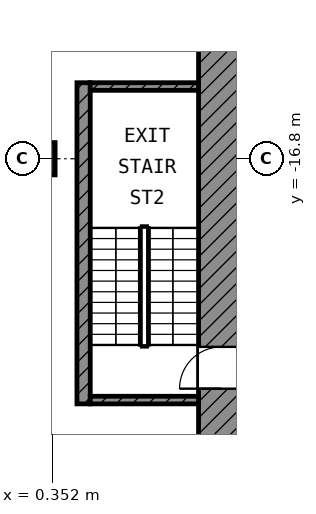
"""IFC4 building model, lengths in metres.
Left out: names, types, materials, properties, quantities, classifications, styles, units other than length and angle.
Written with IfcOpenShell. Run it as: python <this file> out.ifc"""

import sys

from ifc_helpers import new_model, si_unit, direction, frame, frame_2d, origin, origin_2d, place, context, subcontext, project, spatial, rectangle, extrude, element, fill, save


model = new_model("IFC4")
c1 = context("Model", 3, precision=1e-05, world=origin(), true_north=direction((0.0, 1.0)))
c2 = subcontext(c1, "Body", "Model", "MODEL_VIEW")
j1 = project(units=[si_unit("LENGTHUNIT", "METRE"), si_unit("PLANEANGLEUNIT", "RADIAN")], contexts=[c1])
p1 = place(None, origin())
s1 = spatial("IfcSite", under=j1, at=p1, CompositionType="ELEMENT")
p2 = place(p1, origin())
s2 = spatial("IfcBuilding", under=s1, at=p2, CompositionType="ELEMENT")
p3 = place(p2, frame((0.0, 0.0, 234.8)))
s3 = spatial("IfcBuildingStorey", under=s2, at=p3, CompositionType="ELEMENT", Elevation=234.8)
p4 = place(p3, frame((0.0, -16.8, 0.0), z_axis=(0.0, 0.0, 1.0), x_axis=(1.0, 0.0, 0.0)))
e1 = element("IfcColumn", 1, at=p4, inside=s3, PredefinedType="COLUMN", context=c2, shape_type="SweptSolid", body=[
    extrude(rectangle(XDim=0.85, YDim=0.85, at=origin_2d()), origin(), (0.0, 0.0, 1.0), 4.2),
])
p5 = place(p3, frame((4.8, -24.8, 0.0), z_axis=(0.0, 0.0, 1.0), x_axis=(0.0, 1.0, 0.0)))
e2 = element("IfcWall", 2, at=p5, inside=s3, PredefinedType="SHEAR", context=c2, shape_type="SweptSolid", body=[
    extrude(rectangle(XDim=19.4, YDim=1.2, at=frame_2d((9.7, 0.0))), origin(), (0.0, 0.0, 1.0), 3.6),
])
p6 = place(p5, frame((11.25, 0.0, 0.0)))
e3 = element("IfcOpeningElement", 3, at=p6, cuts=e2, PredefinedType="OPENING", context=c2, shape_type="SweptSolid", body=[
    extrude(rectangle(XDim=1.1, YDim=2.1, at=frame_2d((0.55, 1.05))), frame((0.0, 0.61, 0.0), z_axis=(0.0, -1.0, 0.0), x_axis=(1.0, 0.0, 0.0)), (0.0, 0.0, 1.0), 1.22),
])
p7 = place(p5, frame((1.95, 0.0, 0.0)))
e4 = element("IfcOpeningElement", 4, at=p7, cuts=e2, PredefinedType="OPENING", context=c2, shape_type="SweptSolid", body=[
    extrude(rectangle(XDim=1.1, YDim=2.1, at=frame_2d((0.55, 1.05))), frame((0.0, 0.61, 0.0), z_axis=(0.0, -1.0, 0.0), x_axis=(1.0, 0.0, 0.0)), (0.0, 0.0, 1.0), 1.22),
])
p8 = place(p3, frame((1.175, -23.25, 0.0), z_axis=(0.0, 0.0, 1.0), x_axis=(0.0, 1.0, 0.0)))
e5 = element("IfcWall", 5, at=p8, inside=s3, PredefinedType="SHEAR", context=c2, shape_type="SweptSolid", body=[
    extrude(rectangle(XDim=8.45, YDim=0.35, at=frame_2d((4.225, 0.0))), origin(), (0.0, 0.0, 1.0), 3.6),
])
for number, where, z_axis, x_axis in (
    (6, (1.35, -14.9, 0.0), (0.0, 0.0, 1.0), (1.0, 0.0, 0.0)),
    (7, (1.35, -23.15, 0.0), (0.0, 0.0, 1.0), (1.0, 0.0, 0.0)),
):
    element("IfcWall", number, at=place(p3, frame(where, z_axis=z_axis, x_axis=x_axis)), inside=s3, PredefinedType="SHEAR", context=c2, shape_type="SweptSolid", body=[
        extrude(rectangle(XDim=2.85, YDim=0.2, at=frame_2d((1.425, 0.0))), origin(), (0.0, 0.0, 1.0), 3.6),
    ])
p9 = place(p7, origin())
e8 = element("IfcDoor", 8, at=p9, inside=s3, OperationType="SINGLE_SWING_LEFT", PredefinedType="DOOR", context=c2, shape_type="SweptSolid", body=[
    extrude(rectangle(XDim=1.1, YDim=2.1, at=frame_2d((0.55, 1.05))), frame((0.0, 0.025, 0.0), z_axis=(0.0, -1.0, 0.0), x_axis=(1.0, 0.0, 0.0)), (0.0, 0.0, 1.0), 0.05),
])
fill(e4, e8)
save(model, sys.argv[1])
